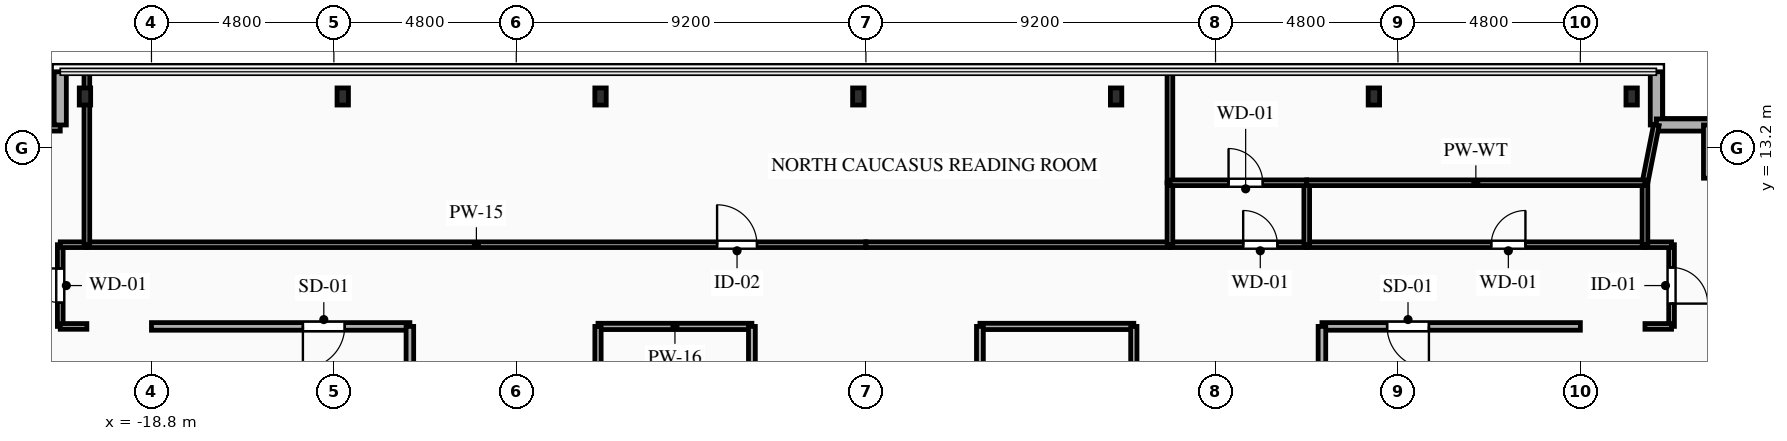
"""IFC4 building model, lengths in metres.
Left out: names, types, materials, properties, quantities, classifications, styles, units other than length and angle.
Written with IfcOpenShell. Run it as: python <this file> out.ifc"""

import sys

from ifc_helpers import new_model, si_unit, direction, frame, frame_2d, origin, origin_2d, place, context, subcontext, project, spatial, rectangle, i_section, extrude, element, fill, save


model = new_model("IFC4")
c1 = context("Model", 3, precision=1e-05, world=origin(), true_north=direction((0.0, 1.0)))
c2 = subcontext(c1, "Body", "Model", "MODEL_VIEW")
j1 = project(units=[si_unit("LENGTHUNIT", "METRE"), si_unit("PLANEANGLEUNIT", "RADIAN")], contexts=[c1])
p1 = place(None, origin())
s1 = spatial("IfcSite", under=j1, at=p1, CompositionType="ELEMENT")
p2 = place(p1, origin())
s2 = spatial("IfcBuilding", under=s1, at=p2, CompositionType="ELEMENT")
p3 = place(p2, frame((0.0, 0.0, 266.0)))
s3 = spatial("IfcBuildingStorey", under=s2, at=p3, CompositionType="ELEMENT", Elevation=266.0)
for number, where, z_axis, x_axis in (
    (1, (20.15, 14.55, 0.0), (0.0, 0.0, 1.0), (1.0, 0.0, 0.0)),
    (2, (13.367, 14.55, 0.0), (0.0, 0.0, 1.0), (1.0, 0.0, 0.0)),
    (3, (6.583, 14.55, 0.0), (0.0, 0.0, 1.0), (1.0, 0.0, 0.0)),
    (4, (-0.2, 14.55, 0.0), (0.0, 0.0, 1.0), (1.0, 0.0, 0.0)),
    (5, (-6.983, 14.55, 0.0), (0.0, 0.0, 1.0), (1.0, 0.0, 0.0)),
    (6, (-13.767, 14.55, 0.0), (0.0, 0.0, 1.0), (1.0, 0.0, 0.0)),
    (7, (-20.55, 14.55, 0.0), (0.0, 0.0, 1.0), (1.0, 0.0, 0.0)),
):
    element("IfcColumn", number, at=place(p3, frame(where, z_axis=z_axis, x_axis=x_axis)), inside=s3, PredefinedType="COLUMN", context=c2, shape_type="SweptSolid", body=[
        extrude(i_section(OverallWidth=0.3, OverallDepth=0.45, WebThickness=0.014, FlangeThickness=0.026, FilletRadius=0.027, at=origin_2d()), origin(), (0.0, 0.0, 1.0), 4.2),
    ])
p4 = place(p3, frame((-22.6, 13.8, 0.0), z_axis=(0.0, 0.0, 1.0), x_axis=(1.0, 0.0, 0.0)))
e8 = element("IfcWall", 8, at=p4, inside=s3, PredefinedType="SOLIDWALL", context=c2, shape_type="SweptSolid", body=[
    extrude(rectangle(XDim=1.4, YDim=0.32, at=frame_2d((0.7, 0.0))), origin(), (0.0, 0.0, 1.0), 3.8),
])
for number, where, z_axis, x_axis in (
    (9, (-21.2, 13.8, 0.0), (0.0, 0.0, 1.0), (0.0, 1.0, 0.0)),
    (10, (20.8, 15.2, 0.0), (0.0, 0.0, 1.0), (0.0, -1.0, 0.0)),
    (11, (20.8, 13.8, 0.0), (0.0, 0.0, 1.0), (1.0, 0.0, 0.0)),
):
    element("IfcWall", number, at=place(p3, frame(where, z_axis=z_axis, x_axis=x_axis)), inside=s3, PredefinedType="SOLIDWALL", context=c2, shape_type="SweptSolid", body=[
        extrude(rectangle(XDim=1.4, YDim=0.32, at=frame_2d((0.7, 0.0))), origin(), (0.0, 0.0, 1.0), 3.8),
    ])
p5 = place(p3, frame((22.2, 13.8, 0.0), z_axis=(0.0, 0.0, 1.0), x_axis=(0.0, -1.0, 0.0)))
e12 = element("IfcWall", 12, at=p5, inside=s3, PredefinedType="SOLIDWALL", context=c2, shape_type="SweptSolid", body=[
    extrude(rectangle(XDim=1.4, YDim=0.32, at=frame_2d((0.7, 0.0))), origin(), (0.0, 0.0, 1.0), 3.8),
])
p6 = place(p3, frame((-12.0, 8.5, 0.0), z_axis=(0.0, 0.0, 1.0), x_axis=(-1.0, 0.0, 0.0)))
e13 = element("IfcWall", 13, at=p6, inside=s3, PredefinedType="PARTITIONING", context=c2, shape_type="SweptSolid", body=[
    extrude(rectangle(XDim=6.8, YDim=0.2, at=frame_2d((3.4, 0.0))), origin(), (0.0, 0.0, 1.0), 3.8),
])
p7 = place(p6, frame((1.715, 0.0, 0.0)))
e14 = element("IfcOpeningElement", 14, at=p7, cuts=e13, PredefinedType="OPENING", context=c2, shape_type="SweptSolid", body=[
    extrude(rectangle(XDim=1.1, YDim=2.15, at=frame_2d((0.55, 1.075))), frame((0.0, 0.11, 0.0), z_axis=(0.0, -1.0, 0.0), x_axis=(1.0, 0.0, 0.0)), (0.0, 0.0, 1.0), 0.22),
])
p8 = place(p3, frame((-12.0, 5.6, 0.0), z_axis=(0.0, 0.0, 1.0), x_axis=(0.0, 1.0, 0.0)))
e15 = element("IfcWall", 15, at=p8, inside=s3, PredefinedType="PARTITIONING", context=c2, shape_type="SweptSolid", body=[
    extrude(rectangle(XDim=2.9, YDim=0.2, at=frame_2d((1.45, 0.0))), origin(), (0.0, 0.0, 1.0), 3.8),
])
p9 = place(p3, frame((18.8, 8.5, 0.0), z_axis=(0.0, 0.0, 1.0), x_axis=(-1.0, 0.0, 0.0)))
e16 = element("IfcWall", 16, at=p9, inside=s3, PredefinedType="PARTITIONING", context=c2, shape_type="SweptSolid", body=[
    extrude(rectangle(XDim=6.8, YDim=0.2, at=frame_2d((3.4, 0.0))), origin(), (0.0, 0.0, 1.0), 3.8),
])
p10 = place(p9, frame((3.985, 0.0, 0.0)))
e17 = element("IfcOpeningElement", 17, at=p10, cuts=e16, PredefinedType="OPENING", context=c2, shape_type="SweptSolid", body=[
    extrude(rectangle(XDim=1.1, YDim=2.15, at=frame_2d((0.55, 1.075))), frame((0.0, 0.11, 0.0), z_axis=(0.0, -1.0, 0.0), x_axis=(1.0, 0.0, 0.0)), (0.0, 0.0, 1.0), 0.22),
])
p11 = place(p3, frame((12.0, 8.5, 0.0), z_axis=(0.0, 0.0, 1.0), x_axis=(0.0, -1.0, 0.0)))
e18 = element("IfcWall", 18, at=p11, inside=s3, PredefinedType="PARTITIONING", context=c2, shape_type="SweptSolid", body=[
    extrude(rectangle(XDim=2.9, YDim=0.2, at=frame_2d((1.45, 0.0))), origin(), (0.0, 0.0, 1.0), 3.8),
])
p12 = place(p3, frame((-3.0, 8.5, 0.0), z_axis=(0.0, 0.0, 1.0), x_axis=(-1.0, 0.0, 0.0)))
e19 = element("IfcWall", 19, at=p12, inside=s3, PredefinedType="PARTITIONING", context=c2, shape_type="SweptSolid", body=[
    extrude(rectangle(XDim=4.05, YDim=0.165, at=frame_2d((2.025, 0.0))), origin(), (0.0, 0.0, 1.0), 3.8),
])
p13 = place(p3, frame((-21.2, 8.5, 0.0), z_axis=(0.0, 0.0, 1.0), x_axis=(0.0, 1.0, 0.0)))
e20 = element("IfcWall", 20, at=p13, inside=s3, PredefinedType="PARTITIONING", context=c2, shape_type="SweptSolid", body=[
    extrude(rectangle(XDim=2.15, YDim=0.15, at=frame_2d((1.075, 0.0))), origin(), (0.0, 0.0, 1.0), 3.455),
])
p14 = place(p13, frame((0.625, 0.0, 0.0)))
e21 = element("IfcOpeningElement", 21, at=p14, cuts=e20, PredefinedType="OPENING", context=c2, shape_type="SweptSolid", body=[
    extrude(rectangle(XDim=0.9, YDim=2.1, at=frame_2d((0.45, 1.05))), frame((0.0, 0.085, 0.0), z_axis=(0.0, -1.0, 0.0), x_axis=(1.0, 0.0, 0.0)), (0.0, 0.0, 1.0), 0.17),
])
for number, where, z_axis, x_axis in (
    (22, (-20.5, 8.5, 0.0), (0.0, 0.0, 1.0), (-1.0, 0.0, 0.0)),
    (23, (-21.2, 10.65, 0.0), (0.0, 0.0, 1.0), (1.0, 0.0, 0.0)),
):
    element("IfcWall", number, at=place(p3, frame(where, z_axis=z_axis, x_axis=x_axis)), inside=s3, PredefinedType="PARTITIONING", context=c2, shape_type="SweptSolid", body=[
        extrude(rectangle(XDim=0.7, YDim=0.15, at=frame_2d((0.35, 0.0))), origin(), (0.0, 0.0, 1.0), 3.8),
    ])
p15 = place(p3, frame((-20.5, 10.65, 0.0), z_axis=(0.0, 0.0, 1.0), x_axis=(1.0, 0.0, 0.0)))
e24 = element("IfcWall", 24, at=p15, inside=s3, PredefinedType="PARTITIONING", context=c2, shape_type="SweptSolid", body=[
    extrude(rectangle(XDim=20.5, YDim=0.15, at=frame_2d((10.25, 0.0))), origin(), (0.0, 0.0, 1.0), 3.8),
])
p16 = place(p15, frame((16.584, 0.0, 0.0)))
e25 = element("IfcOpeningElement", 25, at=p16, cuts=e24, PredefinedType="OPENING", context=c2, shape_type="SweptSolid", body=[
    extrude(rectangle(XDim=1.05, YDim=2.15, at=frame_2d((0.525, 1.075))), frame((0.0, 0.085, 0.0), z_axis=(0.0, -1.0, 0.0), x_axis=(1.0, 0.0, 0.0)), (0.0, 0.0, 1.0), 0.17),
])
p17 = place(p3, frame((7.05, 8.5, 0.0), z_axis=(0.0, 0.0, 1.0), x_axis=(-1.0, 0.0, 0.0)))
e26 = element("IfcWall", 26, at=p17, inside=s3, PredefinedType="PARTITIONING", context=c2, shape_type="SweptSolid", body=[
    extrude(rectangle(XDim=4.05, YDim=0.165, at=frame_2d((2.025, 0.0))), origin(), (0.0, 0.0, 1.0), 3.8),
])
p18 = place(p3, frame((21.2, 10.65, 0.0), z_axis=(0.0, 0.0, 1.0), x_axis=(0.0, -1.0, 0.0)))
e27 = element("IfcWall", 27, at=p18, inside=s3, PredefinedType="PARTITIONING", context=c2, shape_type="SweptSolid", body=[
    extrude(rectangle(XDim=2.15, YDim=0.15, at=frame_2d((1.075, 0.0))), origin(), (0.0, 0.0, 1.0), 3.8),
])
p19 = place(p18, frame((0.6, 0.0, 0.0)))
e28 = element("IfcOpeningElement", 28, at=p19, cuts=e27, PredefinedType="OPENING", context=c2, shape_type="SweptSolid", body=[
    extrude(rectangle(XDim=0.95, YDim=2.1, at=frame_2d((0.475, 1.05))), frame((0.0, 0.085, 0.0), z_axis=(0.0, -1.0, 0.0), x_axis=(1.0, 0.0, 0.0)), (0.0, 0.0, 1.0), 0.17),
])
for number, where, z_axis, x_axis in (
    (29, (20.5, 10.65, 0.0), (0.0, 0.0, 1.0), (1.0, 0.0, 0.0)),
    (30, (21.2, 8.5, 0.0), (0.0, 0.0, 1.0), (-1.0, 0.0, 0.0)),
):
    element("IfcWall", number, at=place(p3, frame(where, z_axis=z_axis, x_axis=x_axis)), inside=s3, PredefinedType="PARTITIONING", context=c2, shape_type="SweptSolid", body=[
        extrude(rectangle(XDim=0.7, YDim=0.15, at=frame_2d((0.35, 0.0))), origin(), (0.0, 0.0, 1.0), 3.8),
    ])
p20 = place(p3, frame((0.0, 10.65, 0.0), z_axis=(0.0, 0.0, 1.0), x_axis=(1.0, 0.0, 0.0)))
e31 = element("IfcWall", 31, at=p20, inside=s3, PredefinedType="PARTITIONING", context=c2, shape_type="SweptSolid", body=[
    extrude(rectangle(XDim=8.0, YDim=0.15, at=frame_2d((4.0, 0.0))), origin(), (0.0, 0.0, 1.0), 3.8),
])
p21 = place(p3, frame((8.0, 10.65, 0.0), z_axis=(0.0, 0.0, 1.0), x_axis=(1.0, 0.0, 0.0)))
e32 = element("IfcWall", 32, at=p21, inside=s3, PredefinedType="PLUMBINGWALL", context=c2, shape_type="SweptSolid", body=[
    extrude(rectangle(XDim=3.6, YDim=0.15, at=frame_2d((1.8, 0.0))), origin(), (0.0, 0.0, 1.0), 3.8),
])
p22 = place(p21, frame((1.927, 0.0, 0.0)))
e33 = element("IfcOpeningElement", 33, at=p22, cuts=e32, PredefinedType="OPENING", context=c2, shape_type="SweptSolid", body=[
    extrude(rectangle(XDim=0.9, YDim=2.1, at=frame_2d((0.45, 1.05))), frame((0.0, 0.085, 0.0), z_axis=(0.0, -1.0, 0.0), x_axis=(1.0, 0.0, 0.0)), (0.0, 0.0, 1.0), 0.17),
])
p23 = place(p3, frame((11.6, 10.65, 0.0), z_axis=(0.0, 0.0, 1.0), x_axis=(1.0, 0.0, 0.0)))
e34 = element("IfcWall", 34, at=p23, inside=s3, PredefinedType="PLUMBINGWALL", context=c2, shape_type="SweptSolid", body=[
    extrude(rectangle(XDim=8.9, YDim=0.15, at=frame_2d((4.45, 0.0))), origin(), (0.0, 0.0, 1.0), 3.8),
])
p24 = place(p23, frame((4.855, 0.0, 0.0)))
e35 = element("IfcOpeningElement", 35, at=p24, cuts=e34, PredefinedType="OPENING", context=c2, shape_type="SweptSolid", body=[
    extrude(rectangle(XDim=0.9, YDim=2.1, at=frame_2d((0.45, 1.05))), frame((0.0, 0.085, 0.0), z_axis=(0.0, -1.0, 0.0), x_axis=(1.0, 0.0, 0.0)), (0.0, 0.0, 1.0), 0.17),
])
p25 = place(p3, frame((-7.05, 8.5, 0.0), z_axis=(0.0, 0.0, 1.0), x_axis=(0.0, -1.0, 0.0)))
e36 = element("IfcWall", 36, at=p25, inside=s3, PredefinedType="PARTITIONING", context=c2, shape_type="SweptSolid", body=[
    extrude(rectangle(XDim=14.1, YDim=0.165, at=frame_2d((7.05, 0.0))), origin(), (0.0, 0.0, 1.0), 3.8),
])
p26 = place(p25, frame((8.011, 0.0, 0.0)))
e37 = element("IfcOpeningElement", 37, at=p26, cuts=e36, PredefinedType="OPENING", context=c2, shape_type="SweptSolid", body=[
    extrude(rectangle(XDim=1.05, YDim=2.15, at=frame_2d((0.525, 1.075))), frame((0.0, 0.093, 0.0), z_axis=(0.0, -1.0, 0.0), x_axis=(1.0, 0.0, 0.0)), (0.0, 0.0, 1.0), 0.185),
])
p27 = place(p3, frame((7.05, -5.6, 0.0), z_axis=(0.0, 0.0, 1.0), x_axis=(0.0, 1.0, 0.0)))
e38 = element("IfcWall", 38, at=p27, inside=s3, PredefinedType="PARTITIONING", context=c2, shape_type="SweptSolid", body=[
    extrude(rectangle(XDim=14.1, YDim=0.165, at=frame_2d((7.05, 0.0))), origin(), (0.0, 0.0, 1.0), 3.8),
])
for number, where, z_axis, x_axis in (
    (39, (3.0, 8.5, 0.0), (0.0, 0.0, 1.0), (0.0, -1.0, 0.0)),
    (40, (-3.0, 2.7, 0.0), (0.0, 0.0, 1.0), (0.0, 1.0, 0.0)),
):
    element("IfcWall", number, at=place(p3, frame(where, z_axis=z_axis, x_axis=x_axis)), inside=s3, PredefinedType="PARTITIONING", context=c2, shape_type="SweptSolid", body=[
        extrude(rectangle(XDim=5.8, YDim=0.18, at=frame_2d((2.9, 0.0))), origin(), (0.0, 0.0, 1.0), 3.8),
    ])
p28 = place(p3, frame((-20.5, 15.2, 0.0), z_axis=(0.0, 0.0, 1.0), x_axis=(0.0, -1.0, 0.0)))
e41 = element("IfcWall", 41, at=p28, inside=s3, PredefinedType="PARTITIONING", context=c2, shape_type="SweptSolid", body=[
    extrude(rectangle(XDim=4.55, YDim=0.15, at=frame_2d((2.275, 0.0))), origin(), (0.0, 0.0, 1.0), 3.425),
])
p29 = place(p3, frame((20.5, 10.65, 0.0), z_axis=(0.0, 0.0, 1.0), x_axis=(0.0, 1.0, 0.0)))
e42 = element("IfcWall", 42, at=p29, inside=s3, PredefinedType="PLUMBINGWALL", context=c2, shape_type="SweptSolid", body=[
    extrude(rectangle(XDim=1.63, YDim=0.15, at=frame_2d((0.815, 0.0))), origin(), (0.0, 0.0, 1.0), 3.8),
])
p30 = place(p3, frame((20.5, 12.28, 0.0), z_axis=(0.0, 0.0, 1.0), x_axis=(0.193660970649, 0.981068513636, 0.0)))
e43 = element("IfcWall", 43, at=p30, inside=s3, PredefinedType="PARTITIONING", context=c2, shape_type="SweptSolid", body=[
    extrude(rectangle(XDim=1.549, YDim=0.15, at=frame_2d((0.775, 0.0))), origin(), (0.0, 0.0, 1.0), 3.8),
])
p31 = place(p3, frame((8.0, 12.28, 0.0), z_axis=(0.0, 0.0, 1.0), x_axis=(0.0, -1.0, 0.0)))
e44 = element("IfcWall", 44, at=p31, inside=s3, PredefinedType="PLUMBINGWALL", context=c2, shape_type="SweptSolid", body=[
    extrude(rectangle(XDim=1.63, YDim=0.15, at=frame_2d((0.815, 0.0))), origin(), (0.0, 0.0, 1.0), 3.8),
])
p32 = place(p3, frame((8.0, 15.2, 0.0), z_axis=(0.0, 0.0, 1.0), x_axis=(0.0, -1.0, 0.0)))
e45 = element("IfcWall", 45, at=p32, inside=s3, PredefinedType="PARTITIONING", context=c2, shape_type="SweptSolid", body=[
    extrude(rectangle(XDim=2.92, YDim=0.15, at=frame_2d((1.46, 0.0))), origin(), (0.0, 0.0, 1.0), 3.8),
])
p33 = place(p3, frame((11.6, 12.28, 0.0), z_axis=(0.0, 0.0, 1.0), x_axis=(0.0, -1.0, 0.0)))
e46 = element("IfcWall", 46, at=p33, inside=s3, PredefinedType="PLUMBINGWALL", context=c2, shape_type="SweptSolid", body=[
    extrude(rectangle(XDim=1.63, YDim=0.15, at=frame_2d((0.815, 0.0))), origin(), (0.0, 0.0, 1.0), 3.8),
])
p34 = place(p3, frame((8.0, 12.28, 0.0), z_axis=(0.0, 0.0, 1.0), x_axis=(1.0, 0.0, 0.0)))
e47 = element("IfcWall", 47, at=p34, inside=s3, PredefinedType="PLUMBINGWALL", context=c2, shape_type="SweptSolid", body=[
    extrude(rectangle(XDim=3.6, YDim=0.15, at=frame_2d((1.8, 0.0))), origin(), (0.0, 0.0, 1.0), 3.8),
])
p35 = place(p34, frame((1.542, 0.0, 0.0)))
e48 = element("IfcOpeningElement", 48, at=p35, cuts=e47, PredefinedType="OPENING", context=c2, shape_type="SweptSolid", body=[
    extrude(rectangle(XDim=0.9, YDim=2.1, at=frame_2d((0.45, 1.05))), frame((0.0, 0.085, 0.0), z_axis=(0.0, -1.0, 0.0), x_axis=(1.0, 0.0, 0.0)), (0.0, 0.0, 1.0), 0.17),
])
p36 = place(p3, frame((11.6, 12.28, 0.0), z_axis=(0.0, 0.0, 1.0), x_axis=(1.0, 0.0, 0.0)))
e49 = element("IfcWall", 49, at=p36, inside=s3, PredefinedType="PLUMBINGWALL", context=c2, shape_type="SweptSolid", body=[
    extrude(rectangle(XDim=8.9, YDim=0.15, at=frame_2d((4.45, 0.0))), origin(), (0.0, 0.0, 1.0), 3.8),
])
p37 = place(p7, origin())
e50 = element("IfcDoor", 50, at=p37, inside=s3, OperationType="SINGLE_SWING_RIGHT", PredefinedType="DOOR", context=c2, shape_type="SweptSolid", body=[
    extrude(rectangle(XDim=1.1, YDim=2.15, at=frame_2d((0.55, 1.075))), frame((0.0, 0.025, 0.0), z_axis=(0.0, -1.0, 0.0), x_axis=(1.0, 0.0, 0.0)), (0.0, 0.0, 1.0), 0.05),
])
fill(e14, e50)
p38 = place(p10, origin())
e51 = element("IfcDoor", 51, at=p38, inside=s3, OperationType="SINGLE_SWING_LEFT", PredefinedType="DOOR", context=c2, shape_type="SweptSolid", body=[
    extrude(rectangle(XDim=1.1, YDim=2.15, at=frame_2d((0.55, 1.075))), frame((0.0, 0.025, 0.0), z_axis=(0.0, -1.0, 0.0), x_axis=(1.0, 0.0, 0.0)), (0.0, 0.0, 1.0), 0.05),
])
fill(e17, e51)
p39 = place(p14, origin())
e52 = element("IfcDoor", 52, at=p39, inside=s3, OperationType="SINGLE_SWING_RIGHT", PredefinedType="DOOR", context=c2, shape_type="SweptSolid", body=[
    extrude(rectangle(XDim=0.9, YDim=2.1, at=frame_2d((0.45, 1.05))), frame((0.0, 0.025, 0.0), z_axis=(0.0, -1.0, 0.0), x_axis=(1.0, 0.0, 0.0)), (0.0, 0.0, 1.0), 0.05),
])
fill(e21, e52)
p40 = place(p16, origin())
e53 = element("IfcDoor", 53, at=p40, inside=s3, OperationType="SINGLE_SWING_LEFT", PredefinedType="DOOR", context=c2, shape_type="SweptSolid", body=[
    extrude(rectangle(XDim=1.05, YDim=2.15, at=frame_2d((0.525, 1.075))), frame((0.0, 0.025, 0.0), z_axis=(0.0, -1.0, 0.0), x_axis=(1.0, 0.0, 0.0)), (0.0, 0.0, 1.0), 0.05),
])
fill(e25, e53)
p41 = place(p19, origin())
e54 = element("IfcDoor", 54, at=p41, inside=s3, OperationType="SINGLE_SWING_RIGHT", PredefinedType="DOOR", context=c2, shape_type="SweptSolid", body=[
    extrude(rectangle(XDim=0.95, YDim=2.1, at=frame_2d((0.475, 1.05))), frame((0.0, 0.025, 0.0), z_axis=(0.0, -1.0, 0.0), x_axis=(1.0, 0.0, 0.0)), (0.0, 0.0, 1.0), 0.05),
])
fill(e28, e54)
p42 = place(p22, origin())
e55 = element("IfcDoor", 55, at=p42, inside=s3, OperationType="SINGLE_SWING_LEFT", PredefinedType="DOOR", context=c2, shape_type="SweptSolid", body=[
    extrude(rectangle(XDim=0.9, YDim=2.1, at=frame_2d((0.45, 1.05))), frame((0.0, 0.025, 0.0), z_axis=(0.0, -1.0, 0.0), x_axis=(1.0, 0.0, 0.0)), (0.0, 0.0, 1.0), 0.05),
])
fill(e33, e55)
p43 = place(p24, origin())
e56 = element("IfcDoor", 56, at=p43, inside=s3, OperationType="SINGLE_SWING_RIGHT", PredefinedType="DOOR", context=c2, shape_type="SweptSolid", body=[
    extrude(rectangle(XDim=0.9, YDim=2.1, at=frame_2d((0.45, 1.05))), frame((0.0, 0.025, 0.0), z_axis=(0.0, -1.0, 0.0), x_axis=(1.0, 0.0, 0.0)), (0.0, 0.0, 1.0), 0.05),
])
fill(e35, e56)
p44 = place(p35, origin())
e57 = element("IfcDoor", 57, at=p44, inside=s3, OperationType="SINGLE_SWING_LEFT", PredefinedType="DOOR", context=c2, shape_type="SweptSolid", body=[
    extrude(rectangle(XDim=0.9, YDim=2.1, at=frame_2d((0.45, 1.05))), frame((0.0, 0.025, 0.0), z_axis=(0.0, -1.0, 0.0), x_axis=(1.0, 0.0, 0.0)), (0.0, 0.0, 1.0), 0.05),
])
fill(e48, e57)
save(model, sys.argv[1])
